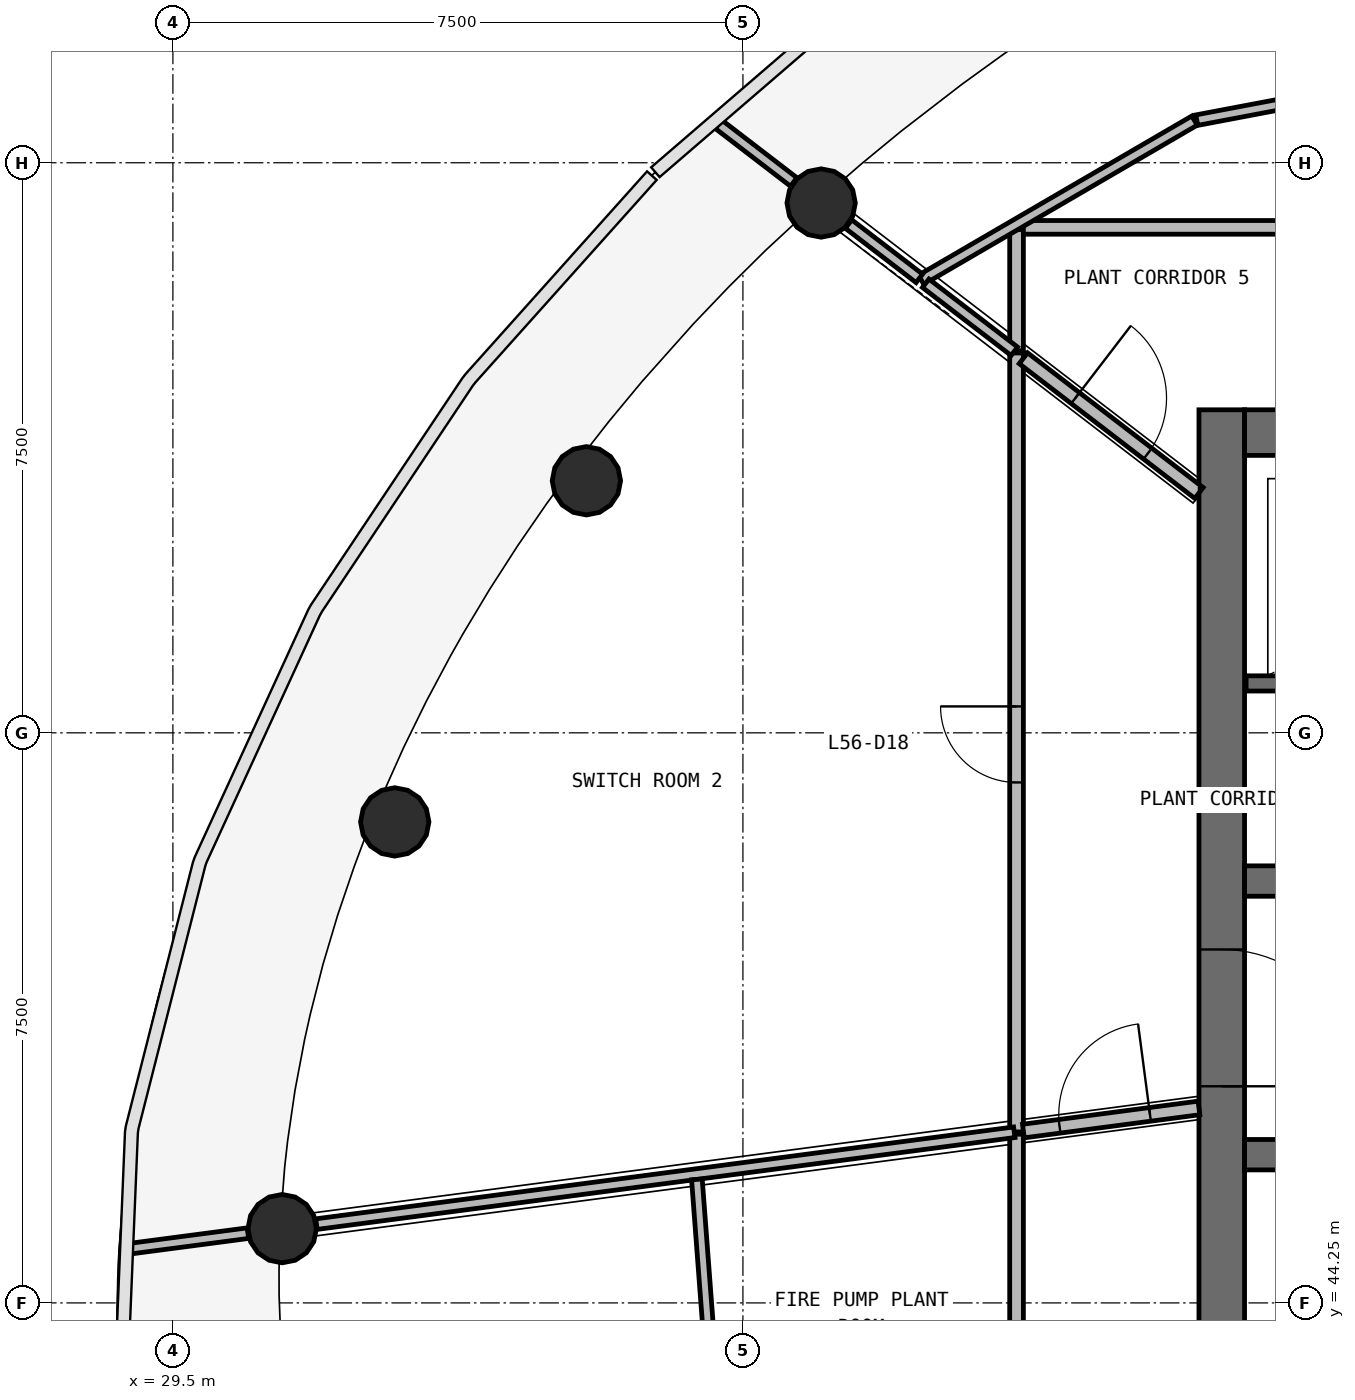
"""IFC4 building model, lengths in metres.
Left out: names, types, materials, properties, quantities, classifications, styles, units other than length and angle.
Written with IfcOpenShell. Run it as: python <this file> out.ifc"""

import sys

from ifc_helpers import new_model, si_unit, direction, frame, frame_2d, origin, origin_2d, place, context, subcontext, project, spatial, rectangle, circle, extrude, source, transform, mapped, element, fill, save


model = new_model("IFC4")
c1 = context("Model", 3, precision=1e-05, world=origin(), true_north=direction((0.0, 1.0)))
c2 = subcontext(c1, "Body", "Model", "MODEL_VIEW")
j1 = project(units=[si_unit("LENGTHUNIT", "METRE"), si_unit("PLANEANGLEUNIT", "RADIAN")], contexts=[c1])
p1 = place(None, origin())
s1 = spatial("IfcSite", under=j1, at=p1, CompositionType="ELEMENT")
p2 = place(p1, origin())
s2 = spatial("IfcBuilding", under=s1, at=p2, CompositionType="ELEMENT")
p3 = place(p2, frame((0.0, 0.0, 230.6)))
s3 = spatial("IfcBuildingStorey", under=s2, at=p3, CompositionType="ELEMENT", Elevation=230.6)
p4 = place(p3, frame((43.3, 56.0, 0.0), z_axis=(0.0, 0.0, 1.0), x_axis=(0.0, -1.0, 0.0)))
e1 = element("IfcWall", 1, at=p4, inside=s3, PredefinedType="SHEAR", context=c2, shape_type="SweptSolid", body=[
    extrude(rectangle(XDim=16.0, YDim=0.6, at=frame_2d((8.0, 0.0))), origin(), (0.0, 0.0, 1.0), 3.9),
])
p5 = place(p4, frame((7.1, 0.0, 0.0)))
e2 = element("IfcOpeningElement", 2, at=p5, cuts=e1, PredefinedType="OPENING", context=c2, shape_type="SweptSolid", body=[
    extrude(rectangle(XDim=1.8, YDim=2.1, at=frame_2d((0.9, 1.05))), frame((0.0, 0.31, 0.0), z_axis=(0.0, -1.0, 0.0), x_axis=(1.0, 0.0, 0.0)), (0.0, 0.0, 1.0), 0.62),
])
p6 = place(p3, frame((60.4, 55.7, 0.0), z_axis=(0.0, 0.0, 1.0), x_axis=(-1.0, 0.0, 0.0)))
e3 = element("IfcWall", 3, at=p6, inside=s3, PredefinedType="SHEAR", context=c2, shape_type="SweptSolid", body=[
    extrude(rectangle(XDim=16.8, YDim=0.6, at=frame_2d((8.4, 0.0))), origin(), (0.0, 0.0, 1.0), 3.9),
])
p7 = place(p6, frame((0.4, 0.0, 0.0)))
e4 = element("IfcOpeningElement", 4, at=p7, cuts=e3, PredefinedType="OPENING", context=c2, shape_type="SweptSolid", body=[
    extrude(rectangle(XDim=1.1, YDim=2.1, at=frame_2d((0.55, 1.05))), frame((0.0, 0.31, 0.0), z_axis=(0.0, -1.0, 0.0), x_axis=(1.0, 0.0, 0.0)), (0.0, 0.0, 1.0), 0.62),
])
p8 = place(p6, frame((10.3, 0.0, 0.0)))
e5 = element("IfcOpeningElement", 5, at=p8, cuts=e3, PredefinedType="OPENING", context=c2, shape_type="SweptSolid", body=[
    extrude(rectangle(XDim=1.2, YDim=2.1, at=frame_2d((0.6, 1.05))), frame((0.0, 0.31, 0.0), z_axis=(0.0, -1.0, 0.0), x_axis=(1.0, 0.0, 0.0)), (0.0, 0.0, 1.0), 0.62),
])
p9 = place(p6, frame((7.25, 0.0, 0.0)))
e6 = element("IfcOpeningElement", 6, at=p9, cuts=e3, PredefinedType="OPENING", context=c2, shape_type="SweptSolid", body=[
    extrude(rectangle(XDim=1.1, YDim=2.1, at=frame_2d((0.55, 1.05))), frame((0.0, 0.31, 0.0), z_axis=(0.0, -1.0, 0.0), x_axis=(1.0, 0.0, 0.0)), (0.0, 0.0, 1.0), 0.62),
])
p10 = place(p3, frame((43.6, 49.8, 0.0), z_axis=(0.0, 0.0, 1.0), x_axis=(1.0, 0.0, 0.0)))
e7 = element("IfcWall", 7, at=p10, inside=s3, PredefinedType="SHEAR", context=c2, shape_type="SweptSolid", body=[
    extrude(rectangle(XDim=16.8, YDim=0.4, at=frame_2d((8.4, 0.0))), origin(), (0.0, 0.0, 1.0), 3.9),
])
p11 = place(p10, frame((4.45, 0.0, 0.0)))
e8 = element("IfcOpeningElement", 8, at=p11, cuts=e7, PredefinedType="OPENING", context=c2, shape_type="SweptSolid", body=[
    extrude(rectangle(XDim=0.9, YDim=2.1, at=frame_2d((0.45, 1.05))), frame((0.0, 0.21, 0.0), z_axis=(0.0, -1.0, 0.0), x_axis=(1.0, 0.0, 0.0)), (0.0, 0.0, 1.0), 0.42),
])
p12 = place(p10, frame((7.85, 0.0, 0.0)))
e9 = element("IfcOpeningElement", 9, at=p12, cuts=e7, PredefinedType="OPENING", context=c2, shape_type="SweptSolid", body=[
    extrude(rectangle(XDim=0.9, YDim=2.1, at=frame_2d((0.45, 1.05))), frame((0.0, 0.21, 0.0), z_axis=(0.0, -1.0, 0.0), x_axis=(1.0, 0.0, 0.0)), (0.0, 0.0, 1.0), 0.42),
])
p13 = place(p3, frame((43.6, 46.2, 0.0), z_axis=(0.0, 0.0, 1.0), x_axis=(1.0, 0.0, 0.0)))
e10 = element("IfcWall", 10, at=p13, inside=s3, PredefinedType="SHEAR", context=c2, shape_type="SweptSolid", body=[
    extrude(rectangle(XDim=16.8, YDim=0.4, at=frame_2d((8.4, 0.0))), origin(), (0.0, 0.0, 1.0), 3.9),
])
p14 = place(p13, frame((7.85, 0.0, 0.0)))
e11 = element("IfcOpeningElement", 11, at=p14, cuts=e10, PredefinedType="OPENING", context=c2, shape_type="SweptSolid", body=[
    extrude(rectangle(XDim=0.9, YDim=2.1, at=frame_2d((0.45, 1.05))), frame((0.0, 0.21, 0.0), z_axis=(0.0, -1.0, 0.0), x_axis=(1.0, 0.0, 0.0)), (0.0, 0.0, 1.0), 0.42),
])
m1 = source(origin(), c2, "Body", "SweptSolid", [
    extrude(circle(Radius=0.45, at=origin_2d()), origin(), (0.0, 0.0, 1.0), 3.58),
])
for number, where, z_axis, x_axis in (
    (12, (38.029, 58.72, 0.0), (0.0, 0.0, 1.0), (1.0, 0.0, 0.0)),
    (13, (34.941, 55.066, 0.0), (0.0, 0.0, 1.0), (1.0, 0.0, 0.0)),
    (14, (32.419, 50.578, 0.0), (0.0, 0.0, 1.0), (1.0, 0.0, 0.0)),
    (15, (30.938, 45.227, 0.0), (0.0, 0.0, 1.0), (1.0, 0.0, 0.0)),
):
    element("IfcColumn", number, at=place(p3, frame(where, z_axis=z_axis, x_axis=x_axis)), inside=s3, PredefinedType="COLUMN", context=c2, shape_type="MappedRepresentation", body=[
        mapped(m1, transform((0.0, 0.0, 0.0), scale=1.0)),
    ])
p15 = place(p3, frame((43.62, 52.4, 0.0), z_axis=(0.0, 0.0, 1.0), x_axis=(1.0, 0.0, 0.0)))
e16 = element("IfcWall", 16, at=p15, inside=s3, PredefinedType="SOLIDWALL", context=c2, shape_type="SweptSolid", body=[
    extrude(rectangle(XDim=6.78, YDim=0.2, at=frame_2d((3.39, 0.0))), origin(), (0.0, 0.0, 1.0), 3.58),
])
p16 = place(p3, frame((40.6, 46.499, 0.0), z_axis=(0.0, 0.0, 1.0), x_axis=(0.0, 1.0, 0.0)))
e17 = element("IfcWall", 17, at=p16, inside=s3, PredefinedType="PARTITIONING", context=c2, shape_type="SweptSolid", body=[
    extrude(rectangle(XDim=10.248, YDim=0.18, at=frame_2d((5.124, 0.0))), origin(), (0.0, 0.0, 1.0), 2.38),
])
p17 = place(p16, frame((4.598, 0.0, 0.0)))
e18 = element("IfcOpeningElement", 18, at=p17, cuts=e17, PredefinedType="OPENING", context=c2, shape_type="SweptSolid", body=[
    extrude(rectangle(XDim=1.0, YDim=2.1, at=frame_2d((0.5, 1.05))), frame((0.0, 0.1, 0.0), z_axis=(0.0, -1.0, 0.0), x_axis=(1.0, 0.0, 0.0)), (0.0, 0.0, 1.0), 0.2),
])
p18 = place(p3, frame((40.6, 58.4, 0.0), z_axis=(0.0, 0.0, 1.0), x_axis=(1.0, 0.0, 0.0)))
e19 = element("IfcWall", 19, at=p18, inside=s3, PredefinedType="PARTITIONING", context=c2, shape_type="SweptSolid", body=[
    extrude(rectangle(XDim=10.031, YDim=0.18, at=frame_2d((5.015, 0.0))), origin(), (0.0, 0.0, 1.0), 2.38),
])
p19 = place(p18, frame((4.581, 0.0, 0.0)))
e20 = element("IfcOpeningElement", 20, at=p19, cuts=e19, PredefinedType="OPENING", context=c2, shape_type="SweptSolid", body=[
    extrude(rectangle(XDim=1.0, YDim=2.1, at=frame_2d((0.5, 1.05))), frame((0.0, 0.1, 0.0), z_axis=(0.0, -1.0, 0.0), x_axis=(1.0, 0.0, 0.0)), (0.0, 0.0, 1.0), 0.2),
])
p20 = place(p3, frame((40.6, 46.469, 0.0), z_axis=(0.0, 0.0, 1.0), x_axis=(0.0, -1.0, 0.0)))
e21 = element("IfcWall", 21, at=p20, inside=s3, PredefinedType="PARTITIONING", context=c2, shape_type="SweptSolid", body=[
    extrude(rectangle(XDim=8.869, YDim=0.18, at=frame_2d((4.435, 0.0))), origin(), (0.0, 0.0, 1.0), 2.38),
])
p21 = place(p3, frame((40.69, 56.678, 0.0), z_axis=(0.0, 0.0, 1.0), x_axis=(0.793371480341, -0.608737787706, 0.0)))
e22 = element("IfcWall", 22, at=p21, inside=s3, PredefinedType="PARTITIONING", context=c2, shape_type="SweptSolid", body=[
    extrude(rectangle(XDim=2.912, YDim=0.18, at=frame_2d((1.456, 0.0))), origin(), (0.0, 0.0, 1.0), 2.38),
])
p22 = place(p21, frame((0.862, 0.0, 0.0)))
e23 = element("IfcOpeningElement", 23, at=p22, cuts=e22, PredefinedType="OPENING", context=c2, shape_type="SweptSolid", body=[
    extrude(rectangle(XDim=1.2, YDim=2.1, at=frame_2d((0.6, 1.05))), frame((0.0, 0.1, 0.0), z_axis=(0.0, -1.0, 0.0), x_axis=(1.0, 0.0, 0.0)), (0.0, 0.0, 1.0), 0.2),
])
p23 = place(p3, frame((40.69, 46.511, 0.0), z_axis=(0.0, 0.0, 1.0), x_axis=(0.991440737811, 0.130557509967, 0.0)))
e24 = element("IfcWall", 24, at=p23, inside=s3, PredefinedType="PARTITIONING", context=c2, shape_type="SweptSolid", body=[
    extrude(rectangle(XDim=2.33, YDim=0.18, at=frame_2d((1.165, 0.0))), origin(), (0.0, 0.0, 1.0), 2.38),
])
p24 = place(p23, frame((0.48, 0.0, 0.0)))
e25 = element("IfcOpeningElement", 25, at=p24, cuts=e24, PredefinedType="OPENING", context=c2, shape_type="SweptSolid", body=[
    extrude(rectangle(XDim=1.2, YDim=2.1, at=frame_2d((0.6, 1.05))), frame((0.0, 0.1, 0.0), z_axis=(0.0, -1.0, 0.0), x_axis=(1.0, 0.0, 0.0)), (0.0, 0.0, 1.0), 0.2),
])
p25 = place(p3, frame((40.6, 58.37, 0.0), z_axis=(0.0, 0.0, 1.0), x_axis=(0.0, -1.0, 0.0)))
e26 = element("IfcWall", 26, at=p25, inside=s3, PredefinedType="PARTITIONING", context=c2, shape_type="SweptSolid", body=[
    extrude(rectangle(XDim=1.593, YDim=0.18, at=frame_2d((0.796, 0.0))), origin(), (0.0, 0.0, 1.0), 2.38),
])
p26 = place(p3, frame((40.57, 46.495, 0.0), z_axis=(0.0, 0.0, 1.0), x_axis=(-0.991446397915, -0.130514520502, 0.0)))
e27 = element("IfcWall", 27, at=p26, inside=s3, PredefinedType="PARTITIONING", context=c2, shape_type="SweptSolid", body=[
    extrude(rectangle(XDim=9.261, YDim=0.14, at=frame_2d((4.631, 0.0))), origin(), (0.0, 0.0, 1.0), 2.38),
])
p27 = place(p3, frame((36.394, 45.875, 0.0), z_axis=(0.0, 0.0, 1.0), x_axis=(0.075408545523, -0.997152722135, 0.0)))
e28 = element("IfcWall", 28, at=p27, inside=s3, PredefinedType="PARTITIONING", context=c2, shape_type="SweptSolid", body=[
    extrude(rectangle(XDim=4.189, YDim=0.14, at=frame_2d((2.095, 0.0))), origin(), (0.0, 0.0, 1.0), 2.38),
])
p28 = place(p3, frame((42.942, 59.805, 0.0), z_axis=(0.0, 0.0, 1.0), x_axis=(-0.864208311026, -0.503134172118, 0.0)))
e29 = element("IfcWall", 29, at=p28, inside=s3, PredefinedType="PARTITIONING", context=c2, shape_type="SweptSolid", body=[
    extrude(rectangle(XDim=4.162, YDim=0.14, at=frame_2d((2.081, 0.0))), origin(), (0.0, 0.0, 1.0), 2.38),
])
p29 = place(p3, frame((42.971, 59.811, 0.0), z_axis=(0.0, 0.0, 1.0), x_axis=(0.982553571564, 0.185979781176, 0.0)))
e30 = element("IfcWall", 30, at=p29, inside=s3, PredefinedType="PARTITIONING", context=c2, shape_type="SweptSolid", body=[
    extrude(rectangle(XDim=3.904, YDim=0.14, at=frame_2d((1.952, 0.0))), origin(), (0.0, 0.0, 1.0), 2.38),
])
p30 = place(p29, frame((1.454, 0.0, 0.0)))
e31 = element("IfcOpeningElement", 31, at=p30, cuts=e30, PredefinedType="OPENING", context=c2, shape_type="SweptSolid", body=[
    extrude(rectangle(XDim=1.0, YDim=2.1, at=frame_2d((0.5, 1.05))), frame((0.0, 0.08, 0.0), z_axis=(0.0, -1.0, 0.0), x_axis=(1.0, 0.0, 0.0)), (0.0, 0.0, 1.0), 0.16),
])
p31 = place(p3, frame((30.487, 45.168, 0.0), z_axis=(0.0, 0.0, 1.0), x_axis=(-0.991448052913, -0.130501947779, 0.0)))
e32 = element("IfcWall", 32, at=p31, inside=s3, PredefinedType="PARTITIONING", context=c2, shape_type="SweptSolid", body=[
    extrude(rectangle(XDim=1.598, YDim=0.14, at=frame_2d((0.799, 0.0))), origin(), (0.0, 0.0, 1.0), 2.88),
])
p32 = place(p3, frame((40.571, 56.77, 0.0), z_axis=(0.0, 0.0, 1.0), x_axis=(-0.793395131444, 0.608706961847, 0.0)))
e33 = element("IfcWall", 33, at=p32, inside=s3, PredefinedType="PARTITIONING", context=c2, shape_type="SweptSolid", body=[
    extrude(rectangle(XDim=1.47, YDim=0.14, at=frame_2d((0.735, 0.0))), origin(), (0.0, 0.0, 1.0), 2.38),
])
p33 = place(p3, frame((37.668, 58.997, 0.0), z_axis=(0.0, 0.0, 1.0), x_axis=(-0.793408114576, 0.608690039121, 0.0)))
e34 = element("IfcWall", 34, at=p33, inside=s3, PredefinedType="PARTITIONING", context=c2, shape_type="SweptSolid", body=[
    extrude(rectangle(XDim=1.249, YDim=0.14, at=frame_2d((0.625, 0.0))), origin(), (0.0, 0.0, 1.0), 2.88),
])
p34 = place(p3, frame((39.321, 57.729, 0.0), z_axis=(0.0, 0.0, 1.0), x_axis=(-0.793388739829, 0.608715292655, 0.0)))
e35 = element("IfcWall", 35, at=p34, inside=s3, PredefinedType="PARTITIONING", context=c2, shape_type="SweptSolid", body=[
    extrude(rectangle(XDim=1.174, YDim=0.14, at=frame_2d((0.587, 0.0))), origin(), (0.0, 0.0, 1.0), 2.38),
])
m2 = source(origin(), c2, "Body", "SweptSolid", [
    extrude(rectangle(XDim=1.8, YDim=2.1, at=frame_2d((0.9, 1.05))), frame((0.0, 0.025, 0.0), z_axis=(0.0, -1.0, 0.0), x_axis=(1.0, 0.0, 0.0)), (0.0, 0.0, 1.0), 0.05),
])
p35 = place(p5, origin())
e36 = element("IfcDoor", 36, at=p35, inside=s3, OperationType="SINGLE_SWING_RIGHT", PredefinedType="DOOR", context=c2, shape_type="MappedRepresentation", body=[
    mapped(m2, transform((0.0, 0.0, 0.0), scale=1.0)),
])
fill(e2, e36)
m3 = source(origin(), c2, "Body", "SweptSolid", [
    extrude(rectangle(XDim=1.0, YDim=2.1, at=frame_2d((0.5, 1.05))), frame((0.0, 0.025, 0.0), z_axis=(0.0, -1.0, 0.0), x_axis=(1.0, 0.0, 0.0)), (0.0, 0.0, 1.0), 0.05),
])
p36 = place(p17, origin())
e37 = element("IfcDoor", 37, at=p36, inside=s3, OperationType="SINGLE_SWING_RIGHT", PredefinedType="DOOR", context=c2, shape_type="MappedRepresentation", body=[
    mapped(m3, transform((0.0, 0.0, 0.0), scale=1.0)),
])
fill(e18, e37)
m4 = source(origin(), c2, "Body", "SweptSolid", [
    extrude(rectangle(XDim=1.2, YDim=2.1, at=frame_2d((0.6, 1.05))), frame((0.0, 0.025, 0.0), z_axis=(0.0, -1.0, 0.0), x_axis=(1.0, 0.0, 0.0)), (0.0, 0.0, 1.0), 0.05),
])
p37 = place(p22, origin())
e38 = element("IfcDoor", 38, at=p37, inside=s3, OperationType="SINGLE_SWING_LEFT", PredefinedType="DOOR", context=c2, shape_type="MappedRepresentation", body=[
    mapped(m4, transform((0.0, 0.0, 0.0), scale=1.0)),
])
fill(e23, e38)
p38 = place(p24, origin())
e39 = element("IfcDoor", 39, at=p38, inside=s3, OperationType="SINGLE_SWING_RIGHT", PredefinedType="DOOR", context=c2, shape_type="MappedRepresentation", body=[
    mapped(m4, transform((0.0, 0.0, 0.0), scale=1.0)),
])
fill(e25, e39)
save(model, sys.argv[1])
